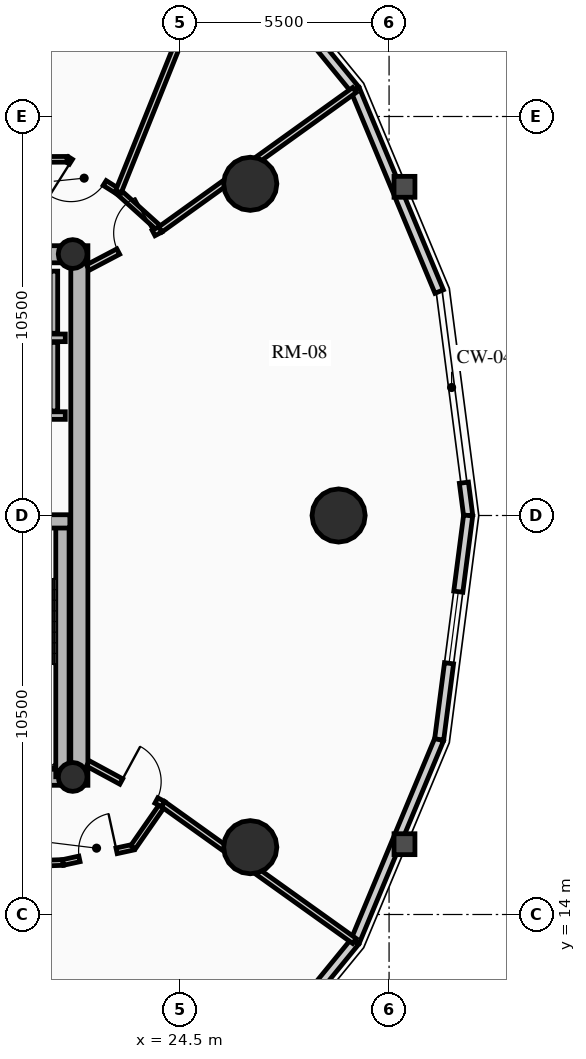
"""IFC4 building model, lengths in metres.
Left out: names, types, materials, properties, quantities, classifications, styles, units other than length and angle.
Written with IfcOpenShell. Run it as: python <this file> out.ifc"""

import sys

from ifc_helpers import new_model, si_unit, direction, frame, frame_2d, origin, origin_2d, place, context, subcontext, project, spatial, rectangle, circle, hollow_circle, extrude, source, transform, mapped, element, fill, save


model = new_model("IFC4")
c1 = context("Model", 3, precision=1e-05, world=origin(), true_north=direction((0.0, 1.0)))
c2 = subcontext(c1, "Body", "Model", "MODEL_VIEW")
j1 = project(units=[si_unit("LENGTHUNIT", "METRE"), si_unit("PLANEANGLEUNIT", "RADIAN")], contexts=[c1])
p1 = place(None, origin())
s1 = spatial("IfcSite", under=j1, at=p1, CompositionType="ELEMENT")
p2 = place(p1, origin())
s2 = spatial("IfcBuilding", under=s1, at=p2, CompositionType="ELEMENT")
p3 = place(p2, frame((0.0, 0.0, 113.8)))
s3 = spatial("IfcBuildingStorey", under=s2, at=p3, CompositionType="ELEMENT", Elevation=113.8)
p4 = place(p3, frame((21.85, 17.4, 0.0), z_axis=(0.0, 0.0, 1.0), x_axis=(0.0, 1.0, 0.0)))
e1 = element("IfcWall", 1, at=p4, inside=s3, PredefinedType="SHEAR", context=c2, shape_type="SweptSolid", body=[
    extrude(rectangle(XDim=14.2, YDim=0.45, at=frame_2d((7.1, 0.0))), origin(), (0.0, 0.0, 1.0), 2.91),
])
p5 = place(p3, frame((11.15, 17.625, 0.0), z_axis=(0.0, 0.0, 1.0), x_axis=(1.0, 0.0, 0.0)))
e2 = element("IfcWall", 2, at=p5, inside=s3, PredefinedType="SHEAR", context=c2, shape_type="SweptSolid", body=[
    extrude(rectangle(XDim=10.7, YDim=0.45, at=frame_2d((5.35, 0.0))), origin(), (0.0, 0.0, 1.0), 2.91),
])
m1 = source(origin(), c2, "Body", "SweptSolid", [
    extrude(rectangle(XDim=1.5, YDim=2.02, at=frame_2d((0.75, 1.01))), frame((0.0, 0.235, 0.0), z_axis=(0.0, -1.0, 0.0), x_axis=(1.0, 0.0, 0.0)), (0.0, 0.0, 1.0), 0.47),
])
p6 = place(p5, frame((5.45, 0.0, 0.0)))
e3 = element("IfcOpeningElement", 3, at=p6, cuts=e2, PredefinedType="OPENING", context=c2, shape_type="MappedRepresentation", body=[
    mapped(m1, transform((0.0, 0.0, 0.0), x_axis=(1.0, 0.0, 0.0), y_axis=(0.0, 1.0, 0.0), z_axis=(0.0, 0.0, 1.0), scale=1.0)),
])
p7 = place(p3, frame((11.15, 31.375, 0.0), z_axis=(0.0, 0.0, 1.0), x_axis=(1.0, 0.0, 0.0)))
e4 = element("IfcWall", 4, at=p7, inside=s3, PredefinedType="SHEAR", context=c2, shape_type="SweptSolid", body=[
    extrude(rectangle(XDim=10.7, YDim=0.45, at=frame_2d((5.35, 0.0))), origin(), (0.0, 0.0, 1.0), 2.91),
])
p8 = place(p7, frame((4.6, 0.0, 0.0)))
e5 = element("IfcOpeningElement", 5, at=p8, cuts=e4, PredefinedType="OPENING", context=c2, shape_type="MappedRepresentation", body=[
    mapped(m1, transform((0.0, 0.0, 0.0), x_axis=(1.0, 0.0, 0.0), y_axis=(0.0, 1.0, 0.0), z_axis=(0.0, 0.0, 1.0), scale=1.0)),
])
p9 = place(p3, frame((21.405, 17.625, 0.0), z_axis=(0.0, 0.0, 1.0), x_axis=(0.0, 1.0, 0.0)))
e6 = element("IfcWall", 6, at=p9, inside=s3, PredefinedType="SHEAR", context=c2, shape_type="SweptSolid", body=[
    extrude(rectangle(XDim=6.72, YDim=0.35, at=frame_2d((3.36, 0.0))), origin(), (0.0, 0.0, 1.0), 2.91),
])
p10 = place(p3, frame((18.315, 24.345, 0.0), z_axis=(0.0, 0.0, 1.0), x_axis=(1.0, 0.0, 0.0)))
e7 = element("IfcWall", 7, at=p10, inside=s3, PredefinedType="SHEAR", context=c2, shape_type="SweptSolid", body=[
    extrude(rectangle(XDim=3.285, YDim=0.35, at=frame_2d((1.643, 0.0))), origin(), (0.0, 0.0, 1.0), 2.91),
])
for number, where, z_axis, x_axis in (
    (8, (21.675, 17.62, 0.0), (0.0, 0.0, 1.0), (1.0, 0.0, 0.0)),
    (9, (21.675, 31.38, 0.0), (0.0, 0.0, 1.0), (1.0, 0.0, 0.0)),
):
    element("IfcColumn", number, at=place(p3, frame(where, z_axis=z_axis, x_axis=x_axis)), inside=s3, PredefinedType="COLUMN", context=c2, shape_type="SweptSolid", body=[
        extrude(hollow_circle(Radius=0.38, WallThickness=0.032, at=origin_2d()), origin(), (0.0, 0.0, 1.0), 2.91),
    ])
for number, where, z_axis, x_axis in (
    (10, (28.672, 24.5, 0.0), (0.0, 0.0, 1.0), (1.0, 0.0, 0.0)),
    (11, (26.347, 33.229, 0.0), (0.0, 0.0, 1.0), (1.0, 0.0, 0.0)),
    (12, (26.347, 15.771, 0.0), (0.0, 0.0, 1.0), (1.0, 0.0, 0.0)),
):
    element("IfcColumn", number, at=place(p3, frame(where, z_axis=z_axis, x_axis=x_axis)), inside=s3, PredefinedType="USERDEFINED", context=c2, shape_type="SweptSolid", body=[
        extrude(circle(Radius=0.7, at=origin_2d()), origin(), (0.0, 0.0, 1.0), 2.91),
    ])
p11 = place(p3, frame((31.969, 25.363, 0.0), z_axis=(0.0, 0.0, 1.0), x_axis=(0.128523364007, -0.991706481225, 0.0)))
e13 = element("IfcWall", 13, at=p11, inside=s3, PredefinedType="SOLIDWALL", context=c2, shape_type="SweptSolid", body=[
    extrude(rectangle(XDim=0.87, YDim=0.24, at=frame_2d((0.435, 0.0))), origin(), (0.0, 0.0, 1.0), 2.655),
])
p12 = place(p3, frame((29.105, 35.709, 0.0), z_axis=(0.0, 0.0, 1.0), x_axis=(0.384344417632, -0.923189779317, 0.0)))
e14 = element("IfcWall", 14, at=p12, inside=s3, PredefinedType="SOLIDWALL", context=c2, shape_type="SweptSolid", body=[
    extrude(rectangle(XDim=5.758, YDim=0.24, at=frame_2d((2.879, 0.0))), origin(), (0.0, 0.0, 1.0), 2.179),
])
p13 = place(p3, frame((25.658, 39.928, 0.0), z_axis=(0.0, 0.0, 1.0), x_axis=(0.632700781152, -0.77439635945, 0.0)))
e15 = element("IfcWall", 15, at=p13, inside=s3, PredefinedType="SOLIDWALL", context=c2, shape_type="SweptSolid", body=[
    extrude(rectangle(XDim=5.448, YDim=0.24, at=frame_2d((2.724, 0.0))), origin(), (0.0, 0.0, 1.0), 2.179),
])
m2 = source(origin(), c2, "Body", "SweptSolid", [
    extrude(rectangle(XDim=1.9, YDim=1.35, at=frame_2d((0.95, 0.675))), frame((0.0, 0.13, 0.0), z_axis=(0.0, -1.0, 0.0), x_axis=(1.0, 0.0, 0.0)), (0.0, 0.0, 1.0), 0.26),
])
p14 = place(p13, frame((1.774, 0.0, 0.65)))
e16 = element("IfcOpeningElement", 16, at=p14, cuts=e15, PredefinedType="OPENING", context=c2, shape_type="MappedRepresentation", body=[
    mapped(m2, transform((0.0, 0.0, 0.0), x_axis=(1.0, 0.0, 0.0), y_axis=(0.0, 1.0, 0.0), z_axis=(0.0, 0.0, 1.0), scale=1.0)),
])
p15 = place(p3, frame((29.105, 13.291, 0.0), z_axis=(0.0, 0.0, 1.0), x_axis=(-0.632700781152, -0.77439635945, 0.0)))
e17 = element("IfcWall", 17, at=p15, inside=s3, PredefinedType="SOLIDWALL", context=c2, shape_type="SweptSolid", body=[
    extrude(rectangle(XDim=5.448, YDim=0.24, at=frame_2d((2.724, 0.0))), origin(), (0.0, 0.0, 1.0), 2.179),
])
p16 = place(p15, frame((1.774, 0.0, 0.65)))
e18 = element("IfcOpeningElement", 18, at=p16, cuts=e17, PredefinedType="OPENING", context=c2, shape_type="MappedRepresentation", body=[
    mapped(m2, transform((0.0, 0.0, 0.0), x_axis=(1.0, 0.0, 0.0), y_axis=(0.0, 1.0, 0.0), z_axis=(0.0, 0.0, 1.0), scale=1.0)),
])
p17 = place(p3, frame((31.318, 18.607, 0.0), z_axis=(0.0, 0.0, 1.0), x_axis=(-0.384344417632, -0.923189779317, 0.0)))
e19 = element("IfcWall", 19, at=p17, inside=s3, PredefinedType="SOLIDWALL", context=c2, shape_type="SweptSolid", body=[
    extrude(rectangle(XDim=5.758, YDim=0.24, at=frame_2d((2.879, 0.0))), origin(), (0.0, 0.0, 1.0), 2.179),
])
p18 = place(p3, frame((32.081, 24.5, 0.0), z_axis=(0.0, 0.0, 1.0), x_axis=(-0.128351991996, -0.991728675672, 0.0)))
e20 = element("IfcWall", 20, at=p18, inside=s3, PredefinedType="SOLIDWALL", context=c2, shape_type="SweptSolid", body=[
    extrude(rectangle(XDim=5.942, YDim=0.24, at=frame_2d((2.971, 0.0))), origin(), (0.0, 0.0, 1.0), 2.179),
])
p19 = place(p18, frame((2.021, 0.0, 0.65)))
e21 = element("IfcOpeningElement", 21, at=p19, cuts=e20, PredefinedType="OPENING", context=c2, shape_type="MappedRepresentation", body=[
    mapped(m2, transform((0.0, 0.0, 0.0), x_axis=(1.0, 0.0, 0.0), y_axis=(0.0, 1.0, 0.0), z_axis=(0.0, 0.0, 1.0), scale=1.0)),
])
for number, where, z_axis, x_axis in (
    (22, (18.51, 27.13, 0.0), (0.0, 0.0, 1.0), (1.0, 0.0, 0.0)),
    (23, (18.51, 29.175, 0.0), (0.0, 0.0, 1.0), (1.0, 0.0, 0.0)),
):
    element("IfcWall", number, at=place(p3, frame(where, z_axis=z_axis, x_axis=x_axis)), inside=s3, PredefinedType="SHEAR", context=c2, shape_type="SweptSolid", body=[
        extrude(rectangle(XDim=2.97, YDim=0.2, at=frame_2d((1.485, 0.0))), origin(), (0.0, 0.0, 1.0), 2.91),
    ])
p20 = place(p3, frame((21.18, 27.25, 0.0), z_axis=(0.0, 0.0, 1.0), x_axis=(0.0, 1.0, 0.0)))
e24 = element("IfcWall", 24, at=p20, inside=s3, PredefinedType="SHEAR", context=c2, shape_type="SweptSolid", body=[
    extrude(rectangle(XDim=1.805, YDim=0.2, at=frame_2d((0.902, 0.0))), origin(), (0.0, 0.0, 1.0), 2.91),
])
p21 = place(p3, frame((21.18, 29.295, 0.0), z_axis=(0.0, 0.0, 1.0), x_axis=(0.0, 1.0, 0.0)))
e25 = element("IfcWall", 25, at=p21, inside=s3, PredefinedType="SHEAR", context=c2, shape_type="SweptSolid", body=[
    extrude(rectangle(XDim=1.635, YDim=0.2, at=frame_2d((0.817, 0.0))), origin(), (0.0, 0.0, 1.0), 2.91),
])
p22 = place(p3, frame((23.98, 32.027, 0.0), z_axis=(0.0, 0.0, 1.0), x_axis=(-0.742353224332, 0.670008724065, 0.0)))
e26 = element("IfcWall", 26, at=p22, inside=s3, PredefinedType="PARTITIONING", context=c2, shape_type="SweptSolid", body=[
    extrude(rectangle(XDim=1.485, YDim=0.15, at=frame_2d((0.742, 0.0))), origin(), (0.0, 0.0, 1.0), 2.225),
])
p23 = place(p3, frame((22.877, 33.022, 0.0), z_axis=(0.0, 0.0, 1.0), x_axis=(-0.845895608855, 0.533348496689, 0.0)))
e27 = element("IfcWall", 27, at=p23, inside=s3, PredefinedType="PARTITIONING", context=c2, shape_type="SweptSolid", body=[
    extrude(rectangle(XDim=1.597, YDim=0.15, at=frame_2d((0.798, 0.0))), origin(), (0.0, 0.0, 1.0), 2.225),
])
m3 = source(origin(), c2, "Body", "SweptSolid", [
    extrude(rectangle(XDim=1.05, YDim=2.015, at=frame_2d((0.525, 1.007))), frame((0.0, 0.085, 0.0), z_axis=(0.0, -1.0, 0.0), x_axis=(1.0, 0.0, 0.0)), (0.0, 0.0, 1.0), 0.17),
])
p24 = place(p23, frame((0.427, 0.0, 0.0)))
e28 = element("IfcOpeningElement", 28, at=p24, cuts=e27, PredefinedType="OPENING", context=c2, shape_type="MappedRepresentation", body=[
    mapped(m3, transform((0.0, 0.0, 0.0), x_axis=(1.0, 0.0, 0.0), y_axis=(0.0, 1.0, 0.0), z_axis=(0.0, 0.0, 1.0), scale=1.0)),
])
p25 = place(p3, frame((21.527, 33.873, 0.0), z_axis=(0.0, 0.0, 1.0), x_axis=(-0.999991838845, -0.004040079574, 0.0)))
e29 = element("IfcWall", 29, at=p25, inside=s3, PredefinedType="PARTITIONING", context=c2, shape_type="SweptSolid", body=[
    extrude(rectangle(XDim=3.384, YDim=0.15, at=frame_2d((1.692, 0.0))), origin(), (0.0, 0.0, 1.0), 2.225),
])
p26 = place(p3, frame((14.781, 15.141, 0.0), z_axis=(0.0, 0.0, 1.0), x_axis=(0.999407918707, 0.034406569513, 0.0)))
e30 = element("IfcWall", 30, at=p26, inside=s3, PredefinedType="PARTITIONING", context=c2, shape_type="SweptSolid", body=[
    extrude(rectangle(XDim=6.642, YDim=0.15, at=frame_2d((3.321, 0.0))), origin(), (0.0, 0.0, 1.0), 2.225),
])
p27 = place(p3, frame((21.419, 15.369, 0.0), z_axis=(0.0, 0.0, 1.0), x_axis=(0.977192701953, 0.212354475464, 0.0)))
e31 = element("IfcWall", 31, at=p27, inside=s3, PredefinedType="PARTITIONING", context=c2, shape_type="SweptSolid", body=[
    extrude(rectangle(XDim=1.888, YDim=0.15, at=frame_2d((0.944, 0.0))), origin(), (0.0, 0.0, 1.0), 2.225),
])
m4 = source(origin(), c2, "Body", "SweptSolid", [
    extrude(rectangle(XDim=1.0, YDim=2.015, at=frame_2d((0.5, 1.007))), frame((0.0, 0.085, 0.0), z_axis=(0.0, -1.0, 0.0), x_axis=(1.0, 0.0, 0.0)), (0.0, 0.0, 1.0), 0.17),
])
p28 = place(p27, frame((0.444, 0.0, 0.0)))
e32 = element("IfcOpeningElement", 32, at=p28, cuts=e31, PredefinedType="OPENING", context=c2, shape_type="MappedRepresentation", body=[
    mapped(m4, transform((0.0, 0.0, 0.0), x_axis=(1.0, 0.0, 0.0), y_axis=(0.0, 1.0, 0.0), z_axis=(0.0, 0.0, 1.0), scale=1.0)),
])
p29 = place(p3, frame((23.263, 15.77, 0.0), z_axis=(0.0, 0.0, 1.0), x_axis=(0.570743456919, 0.821128434768, 0.0)))
e33 = element("IfcWall", 33, at=p29, inside=s3, PredefinedType="PARTITIONING", context=c2, shape_type="SweptSolid", body=[
    extrude(rectangle(XDim=1.382, YDim=0.15, at=frame_2d((0.691, 0.0))), origin(), (0.0, 0.0, 1.0), 2.225),
])
p30 = place(p3, frame((23.98, 32.027, 0.0), z_axis=(0.0, 0.0, 1.0), x_axis=(0.812162479031, 0.58343132214, 0.0)))
e34 = element("IfcWall", 34, at=p30, inside=s3, PredefinedType="PARTITIONING", context=c2, shape_type="SweptSolid", body=[
    extrude(rectangle(XDim=6.291, YDim=0.16, at=frame_2d((3.146, 0.0))), origin(), (0.0, 0.0, 1.0), 2.179),
])
p31 = place(p3, frame((22.877, 33.022, 0.0), z_axis=(0.0, 0.0, 1.0), x_axis=(0.372898022516, 0.927872332168, 0.0)))
e35 = element("IfcWall", 35, at=p31, inside=s3, PredefinedType="PARTITIONING", context=c2, shape_type="SweptSolid", body=[
    extrude(rectangle(XDim=7.426, YDim=0.16, at=frame_2d((3.713, 0.0))), origin(), (0.0, 0.0, 1.0), 2.179),
])
p32 = place(p3, frame((24.052, 16.905, 0.0), z_axis=(0.0, 0.0, 1.0), x_axis=(0.813437670746, -0.581652091727, 0.0)))
e36 = element("IfcWall", 36, at=p32, inside=s3, PredefinedType="PARTITIONING", context=c2, shape_type="SweptSolid", body=[
    extrude(rectangle(XDim=6.192, YDim=0.16, at=frame_2d((3.096, 0.0))), origin(), (0.0, 0.0, 1.0), 2.179),
])
p33 = place(p3, frame((22.075, 31.025, 0.0), z_axis=(0.0, 0.0, 1.0), x_axis=(0.885026466958, 0.465540710125, 0.0)))
e37 = element("IfcWall", 37, at=p33, inside=s3, PredefinedType="PARTITIONING", context=c2, shape_type="SweptSolid", body=[
    extrude(rectangle(XDim=2.152, YDim=0.16, at=frame_2d((1.076, 0.0))), origin(), (0.0, 0.0, 1.0), 2.225),
])
m5 = source(origin(), c2, "Body", "SweptSolid", [
    extrude(rectangle(XDim=1.05, YDim=2.015, at=frame_2d((0.525, 1.007))), frame((0.0, 0.09, 0.0), z_axis=(0.0, -1.0, 0.0), x_axis=(1.0, 0.0, 0.0)), (0.0, 0.0, 1.0), 0.18),
])
p34 = place(p33, frame((0.902, 0.0, 0.0)))
e38 = element("IfcOpeningElement", 38, at=p34, cuts=e37, PredefinedType="OPENING", context=c2, shape_type="MappedRepresentation", body=[
    mapped(m5, transform((0.0, 0.0, 0.0), x_axis=(1.0, 0.0, 0.0), y_axis=(0.0, 1.0, 0.0), z_axis=(0.0, 0.0, 1.0), scale=1.0)),
])
p35 = place(p3, frame((22.075, 17.975, 0.0), z_axis=(0.0, 0.0, 1.0), x_axis=(0.879356383302, -0.476164206073, 0.0)))
e39 = element("IfcWall", 39, at=p35, inside=s3, PredefinedType="PARTITIONING", context=c2, shape_type="SweptSolid", body=[
    extrude(rectangle(XDim=2.248, YDim=0.16, at=frame_2d((1.124, 0.0))), origin(), (0.0, 0.0, 1.0), 2.225),
])
p36 = place(p35, frame((0.998, 0.0, 0.0)))
e40 = element("IfcOpeningElement", 40, at=p36, cuts=e39, PredefinedType="OPENING", context=c2, shape_type="MappedRepresentation", body=[
    mapped(m5, transform((0.0, 0.0, 0.0), x_axis=(1.0, 0.0, 0.0), y_axis=(0.0, 1.0, 0.0), z_axis=(0.0, 0.0, 1.0), scale=1.0)),
])
m6 = source(origin(), c2, "Body", "SweptSolid", [
    extrude(rectangle(XDim=1.9, YDim=1.35, at=frame_2d((0.95, 0.675))), frame((0.0, 0.03, 0.0), z_axis=(0.0, -1.0, 0.0), x_axis=(1.0, 0.0, 0.0)), (0.0, 0.0, 1.0), 0.06),
])
p37 = place(p19, origin())
e41 = element("IfcWindow", 41, at=p37, inside=s3, PartitioningType="DOUBLE_PANEL_VERTICAL", PredefinedType="WINDOW", context=c2, shape_type="MappedRepresentation", body=[
    mapped(m6, transform((0.0, 0.0, 0.0), x_axis=(1.0, 0.0, 0.0), y_axis=(0.0, 1.0, 0.0), z_axis=(0.0, 0.0, 1.0), scale=1.0)),
])
fill(e21, e41)
m7 = source(origin(), c2, "Body", "SweptSolid", [
    extrude(rectangle(XDim=1.05, YDim=2.015, at=frame_2d((0.525, 1.007))), frame((0.0, 0.025, 0.0), z_axis=(0.0, -1.0, 0.0), x_axis=(1.0, 0.0, 0.0)), (0.0, 0.0, 1.0), 0.05),
])
p38 = place(p34, origin())
e42 = element("IfcDoor", 42, at=p38, inside=s3, OperationType="SINGLE_SWING_RIGHT", PredefinedType="DOOR", context=c2, shape_type="MappedRepresentation", body=[
    mapped(m7, transform((0.0, 0.0, 0.0), x_axis=(1.0, 0.0, 0.0), y_axis=(0.0, 1.0, 0.0), z_axis=(0.0, 0.0, 1.0), scale=1.0)),
])
fill(e38, e42)
p39 = place(p36, origin())
e43 = element("IfcDoor", 43, at=p39, inside=s3, OperationType="SINGLE_SWING_LEFT", PredefinedType="DOOR", context=c2, shape_type="MappedRepresentation", body=[
    mapped(m7, transform((0.0, 0.0, 0.0), x_axis=(1.0, 0.0, 0.0), y_axis=(0.0, 1.0, 0.0), z_axis=(0.0, 0.0, 1.0), scale=1.0)),
])
fill(e40, e43)
p40 = place(p24, origin())
e44 = element("IfcDoor", 44, at=p40, inside=s3, OperationType="SINGLE_SWING_RIGHT", PredefinedType="DOOR", context=c2, shape_type="MappedRepresentation", body=[
    mapped(m7, transform((0.0, 0.0, 0.0), x_axis=(1.0, 0.0, 0.0), y_axis=(0.0, 1.0, 0.0), z_axis=(0.0, 0.0, 1.0), scale=1.0)),
])
fill(e28, e44)
m8 = source(origin(), c2, "Body", "SweptSolid", [
    extrude(rectangle(XDim=1.0, YDim=2.015, at=frame_2d((0.5, 1.007))), frame((0.0, 0.025, 0.0), z_axis=(0.0, -1.0, 0.0), x_axis=(1.0, 0.0, 0.0)), (0.0, 0.0, 1.0), 0.05),
])
p41 = place(p28, origin())
e45 = element("IfcDoor", 45, at=p41, inside=s3, OperationType="SINGLE_SWING_RIGHT", PredefinedType="DOOR", context=c2, shape_type="MappedRepresentation", body=[
    mapped(m8, transform((0.0, 0.0, 0.0), x_axis=(1.0, 0.0, 0.0), y_axis=(0.0, 1.0, 0.0), z_axis=(0.0, 0.0, 1.0), scale=1.0)),
])
fill(e32, e45)
save(model, sys.argv[1])
